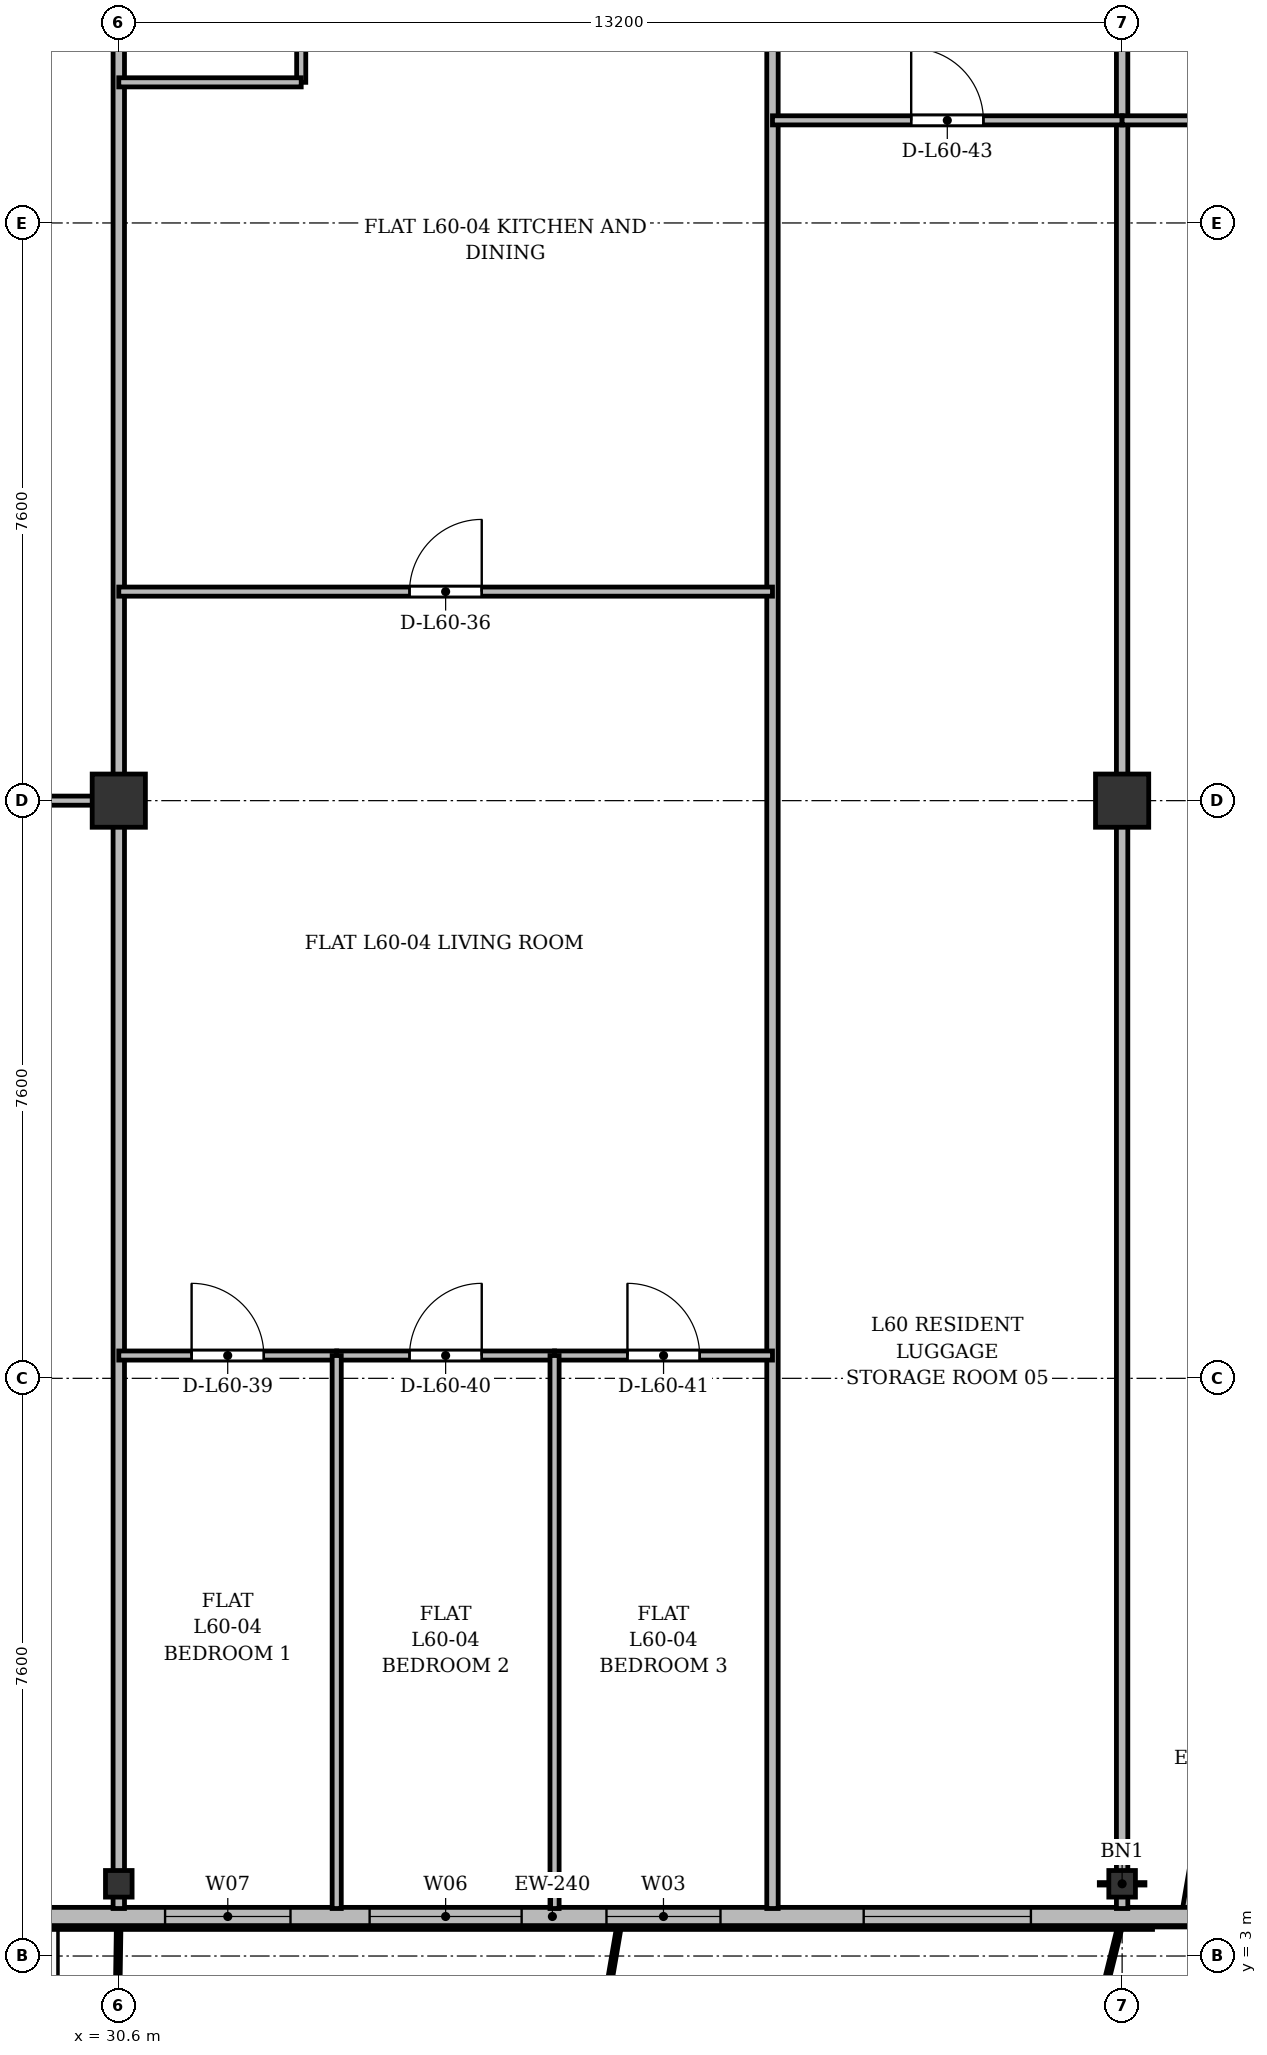
"""IFC4 building model, lengths in metres.
Left out: names, types, materials, properties, quantities, classifications, styles, units other than length and angle.
Written with IfcOpenShell. Run it as: python <this file> out.ifc"""

import sys

from ifc_helpers import new_model, si_unit, direction, frame, frame_2d, origin, origin_2d, place, context, subcontext, project, spatial, rectangle, i_section, extrude, source, transform, mapped, element, fill, save


model = new_model("IFC4")
c1 = context("Model", 3, precision=1e-05, world=origin(), true_north=direction((0.0, 1.0)))
c2 = subcontext(c1, "Body", "Model", "MODEL_VIEW")
j1 = project(units=[si_unit("LENGTHUNIT", "METRE"), si_unit("PLANEANGLEUNIT", "RADIAN")], contexts=[c1])
p1 = place(None, origin())
s1 = spatial("IfcSite", under=j1, at=p1, CompositionType="ELEMENT")
p2 = place(p1, origin())
s2 = spatial("IfcBuilding", under=s1, at=p2, CompositionType="ELEMENT")
p3 = place(p2, frame((0.0, 0.0, 230.1)))
s3 = spatial("IfcBuildingStorey", under=s2, at=p3, CompositionType="ELEMENT", Elevation=230.1)
m1 = source(origin(), c2, "Body", "SweptSolid", [
    extrude(i_section(OverallWidth=0.35, OverallDepth=0.35, WebThickness=0.018, FlangeThickness=0.028, at=origin_2d()), origin(), (0.0, 0.0, 1.0), 3.6),
])
p4 = place(p3, frame((30.6, 3.95, 0.0), z_axis=(0.0, 0.0, 1.0), x_axis=(1.0, 0.0, 0.0)))
e1 = element("IfcColumn", 1, at=p4, inside=s3, PredefinedType="COLUMN", context=c2, shape_type="MappedRepresentation", body=[
    mapped(m1, transform((0.0, 0.0, 0.0), x_axis=(1.0, 0.0, 0.0), y_axis=(0.0, 1.0, 0.0), z_axis=(0.0, 0.0, 1.0), scale=1.0)),
])
m2 = source(origin(), c2, "Body", "SweptSolid", [
    extrude(rectangle(XDim=0.7, YDim=0.7, at=origin_2d()), origin(), (0.0, 0.0, 1.0), 3.6),
])
p5 = place(p3, frame((30.6, 18.2, 0.0), z_axis=(0.0, 0.0, 1.0), x_axis=(1.0, 0.0, 0.0)))
e2 = element("IfcColumn", 2, at=p5, inside=s3, PredefinedType="COLUMN", context=c2, shape_type="MappedRepresentation", body=[
    mapped(m2, transform((0.0, 0.0, 0.0), x_axis=(1.0, 0.0, 0.0), y_axis=(0.0, 1.0, 0.0), z_axis=(0.0, 0.0, 1.0), scale=1.0)),
])
p6 = place(p3, frame((43.8, 3.95, 0.0), z_axis=(0.0, 0.0, 1.0), x_axis=(1.0, 0.0, 0.0)))
e3 = element("IfcColumn", 3, at=p6, inside=s3, PredefinedType="COLUMN", context=c2, shape_type="MappedRepresentation", body=[
    mapped(m1, transform((0.0, 0.0, 0.0), x_axis=(1.0, 0.0, 0.0), y_axis=(0.0, 1.0, 0.0), z_axis=(0.0, 0.0, 1.0), scale=1.0)),
])
p7 = place(p3, frame((43.8, 18.2, 0.0), z_axis=(0.0, 0.0, 1.0), x_axis=(1.0, 0.0, 0.0)))
e4 = element("IfcColumn", 4, at=p7, inside=s3, PredefinedType="COLUMN", context=c2, shape_type="MappedRepresentation", body=[
    mapped(m2, transform((0.0, 0.0, 0.0), x_axis=(1.0, 0.0, 0.0), y_axis=(0.0, 1.0, 0.0), z_axis=(0.0, 0.0, 1.0), scale=1.0)),
])
p8 = place(p3, frame((45.282, 6.92, 0.0), z_axis=(0.0, 0.0, 1.0), x_axis=(-0.168990530437, -0.98561767467, 0.0)))
e5 = element("IfcWall", 5, at=p8, inside=s3, PredefinedType="SOLIDWALL", context=c2, shape_type="SweptSolid", body=[
    extrude(rectangle(XDim=3.551, YDim=0.24, at=frame_2d((1.775, 0.0))), origin(), (0.0, 0.0, 1.0), 2.91),
])
p9 = place(p3, frame((44.8, 3.52, 0.0), z_axis=(0.0, 0.0, 1.0), x_axis=(-1.0, 0.0, 0.0)))
e6 = element("IfcWall", 6, at=p9, inside=s3, PredefinedType="SOLIDWALL", context=c2, shape_type="SweptSolid", body=[
    extrude(rectangle(XDim=33.8, YDim=0.24, at=frame_2d((16.9, 0.0))), origin(), (0.0, 0.0, 1.0), 3.36),
])
p10 = place(p9, frame((2.2, 0.0, 0.9)))
e7 = element("IfcOpeningElement", 7, at=p10, cuts=e6, PredefinedType="OPENING", context=c2, shape_type="SweptSolid", body=[
    extrude(rectangle(XDim=2.2, YDim=1.8, at=frame_2d((1.1, 0.9))), frame((0.0, 0.13, 0.0), z_axis=(0.0, -1.0, 0.0), x_axis=(1.0, 0.0, 0.0)), (0.0, 0.0, 1.0), 0.26),
])
p11 = place(p9, frame((6.284, 0.0, 0.9)))
e8 = element("IfcOpeningElement", 8, at=p11, cuts=e6, PredefinedType="OPENING", context=c2, shape_type="SweptSolid", body=[
    extrude(rectangle(XDim=1.5, YDim=1.75, at=frame_2d((0.75, 0.875))), frame((0.0, 0.13, 0.0), z_axis=(0.0, -1.0, 0.0), x_axis=(1.0, 0.0, 0.0)), (0.0, 0.0, 1.0), 0.26),
])
p12 = place(p9, frame((8.9, 0.0, 0.9)))
e9 = element("IfcOpeningElement", 9, at=p12, cuts=e6, PredefinedType="OPENING", context=c2, shape_type="SweptSolid", body=[
    extrude(rectangle(XDim=2.0, YDim=1.95, at=frame_2d((1.0, 0.975))), frame((0.0, 0.13, 0.0), z_axis=(0.0, -1.0, 0.0), x_axis=(1.0, 0.0, 0.0)), (0.0, 0.0, 1.0), 0.26),
])
p13 = place(p9, frame((11.941, 0.0, 0.9)))
e10 = element("IfcOpeningElement", 10, at=p13, cuts=e6, PredefinedType="OPENING", context=c2, shape_type="SweptSolid", body=[
    extrude(rectangle(XDim=1.65, YDim=1.85, at=frame_2d((0.825, 0.925))), frame((0.0, 0.13, 0.0), z_axis=(0.0, -1.0, 0.0), x_axis=(1.0, 0.0, 0.0)), (0.0, 0.0, 1.0), 0.26),
])
p14 = place(p9, frame((17.291, 0.0, 0.0)))
e11 = element("IfcOpeningElement", 11, at=p14, cuts=e6, PredefinedType="OPENING", context=c2, shape_type="SweptSolid", body=[
    extrude(rectangle(XDim=1.2, YDim=2.2, at=frame_2d((0.6, 1.1))), frame((0.0, 0.13, 0.0), z_axis=(0.0, -1.0, 0.0), x_axis=(1.0, 0.0, 0.0)), (0.0, 0.0, 1.0), 0.26),
])
p15 = place(p9, frame((22.25, 0.0, 0.9)))
e12 = element("IfcOpeningElement", 12, at=p15, cuts=e6, PredefinedType="OPENING", context=c2, shape_type="SweptSolid", body=[
    extrude(rectangle(XDim=2.2, YDim=1.8, at=frame_2d((1.1, 0.9))), frame((0.0, 0.13, 0.0), z_axis=(0.0, -1.0, 0.0), x_axis=(1.0, 0.0, 0.0)), (0.0, 0.0, 1.0), 0.26),
])
p16 = place(p9, frame((26.5, 0.0, 0.9)))
e13 = element("IfcOpeningElement", 13, at=p16, cuts=e6, PredefinedType="OPENING", context=c2, shape_type="SweptSolid", body=[
    extrude(rectangle(XDim=1.5, YDim=1.75, at=frame_2d((0.75, 0.875))), frame((0.0, 0.13, 0.0), z_axis=(0.0, -1.0, 0.0), x_axis=(1.0, 0.0, 0.0)), (0.0, 0.0, 1.0), 0.26),
])
p17 = place(p9, frame((30.455, 0.0, 0.9)))
e14 = element("IfcOpeningElement", 14, at=p17, cuts=e6, PredefinedType="OPENING", context=c2, shape_type="SweptSolid", body=[
    extrude(rectangle(XDim=2.0, YDim=1.95, at=frame_2d((1.0, 0.975))), frame((0.0, 0.13, 0.0), z_axis=(0.0, -1.0, 0.0), x_axis=(1.0, 0.0, 0.0)), (0.0, 0.0, 1.0), 0.26),
])
p18 = place(p3, frame((30.6, 3.625, 0.0), z_axis=(0.0, 0.0, 1.0), x_axis=(0.0, 1.0, 0.0)))
e15 = element("IfcWall", 15, at=p18, inside=s3, PredefinedType="PARTITIONING", context=c2, shape_type="SweptSolid", body=[
    extrude(rectangle(XDim=27.375, YDim=0.15, at=frame_2d((13.688, 0.0))), origin(), (0.0, 0.0, 1.0), 2.86),
])
p19 = place(p3, frame((39.2, 3.625, 0.0), z_axis=(0.0, 0.0, 1.0), x_axis=(0.0, 1.0, 0.0)))
e16 = element("IfcWall", 16, at=p19, inside=s3, PredefinedType="PARTITIONING", context=c2, shape_type="SweptSolid", body=[
    extrude(rectangle(XDim=27.375, YDim=0.15, at=frame_2d((13.688, 0.0))), origin(), (0.0, 0.0, 1.0), 2.91),
])
p20 = place(p3, frame((43.8, 3.625, 0.0), z_axis=(0.0, 0.0, 1.0), x_axis=(0.0, 1.0, 0.0)))
e17 = element("IfcWall", 17, at=p20, inside=s3, PredefinedType="PARTITIONING", context=c2, shape_type="SweptSolid", body=[
    extrude(rectangle(XDim=27.375, YDim=0.15, at=frame_2d((13.688, 0.0))), origin(), (0.0, 0.0, 1.0), 2.86),
])
p21 = place(p3, frame((23.4, 18.2, 0.0), z_axis=(0.0, 0.0, 1.0), x_axis=(1.0, 0.0, 0.0)))
e18 = element("IfcWall", 18, at=p21, inside=s3, PredefinedType="PARTITIONING", context=c2, shape_type="SweptSolid", body=[
    extrude(rectangle(XDim=7.2, YDim=0.12, at=frame_2d((3.6, 0.0))), origin(), (0.0, 0.0, 1.0), 2.91),
])
p22 = place(p21, frame((3.125, 0.0, 0.0)))
e19 = element("IfcOpeningElement", 19, at=p22, cuts=e18, PredefinedType="OPENING", context=c2, shape_type="SweptSolid", body=[
    extrude(rectangle(XDim=0.95, YDim=2.15, at=frame_2d((0.475, 1.075))), frame((0.0, 0.07, 0.0), z_axis=(0.0, -1.0, 0.0), x_axis=(1.0, 0.0, 0.0)), (0.0, 0.0, 1.0), 0.14),
])
p23 = place(p3, frame((30.6, 20.95, 0.0), z_axis=(0.0, 0.0, 1.0), x_axis=(1.0, 0.0, 0.0)))
e20 = element("IfcWall", 20, at=p23, inside=s3, PredefinedType="PARTITIONING", context=c2, shape_type="SweptSolid", body=[
    extrude(rectangle(XDim=8.6, YDim=0.12, at=frame_2d((4.3, 0.0))), origin(), (0.0, 0.0, 1.0), 2.86),
])
p24 = place(p23, frame((3.825, 0.0, 0.0)))
e21 = element("IfcOpeningElement", 21, at=p24, cuts=e20, PredefinedType="OPENING", context=c2, shape_type="SweptSolid", body=[
    extrude(rectangle(XDim=0.95, YDim=2.15, at=frame_2d((0.475, 1.075))), frame((0.0, 0.07, 0.0), z_axis=(0.0, -1.0, 0.0), x_axis=(1.0, 0.0, 0.0)), (0.0, 0.0, 1.0), 0.14),
])
p25 = place(p3, frame((33.0, 27.65, 0.0), z_axis=(0.0, 0.0, 1.0), x_axis=(0.0, 1.0, 0.0)))
e22 = element("IfcWall", 22, at=p25, inside=s3, PredefinedType="PARTITIONING", context=c2, shape_type="SweptSolid", body=[
    extrude(rectangle(XDim=3.35, YDim=0.12, at=frame_2d((1.675, 0.0))), origin(), (0.0, 0.0, 1.0), 3.36),
])
p26 = place(p25, frame((0.8, 0.0, 0.0)))
e23 = element("IfcOpeningElement", 23, at=p26, cuts=e22, PredefinedType="OPENING", context=c2, shape_type="SweptSolid", body=[
    extrude(rectangle(XDim=0.85, YDim=2.1, at=frame_2d((0.425, 1.05))), frame((0.0, 0.07, 0.0), z_axis=(0.0, -1.0, 0.0), x_axis=(1.0, 0.0, 0.0)), (0.0, 0.0, 1.0), 0.14),
])
p27 = place(p3, frame((30.6, 27.65, 0.0), z_axis=(0.0, 0.0, 1.0), x_axis=(1.0, 0.0, 0.0)))
e24 = element("IfcWall", 24, at=p27, inside=s3, PredefinedType="PARTITIONING", context=c2, shape_type="SweptSolid", body=[
    extrude(rectangle(XDim=2.4, YDim=0.12, at=frame_2d((1.2, 0.0))), origin(), (0.0, 0.0, 1.0), 2.86),
])
p28 = place(p3, frame((30.6, 10.9, 0.0), z_axis=(0.0, 0.0, 1.0), x_axis=(1.0, 0.0, 0.0)))
e25 = element("IfcWall", 25, at=p28, inside=s3, PredefinedType="PARTITIONING", context=c2, shape_type="SweptSolid", body=[
    extrude(rectangle(XDim=2.867, YDim=0.12, at=frame_2d((1.434, 0.0))), origin(), (0.0, 0.0, 1.0), 2.86),
])
p29 = place(p28, frame((0.958, 0.0, 0.0)))
e26 = element("IfcOpeningElement", 26, at=p29, cuts=e25, PredefinedType="OPENING", context=c2, shape_type="SweptSolid", body=[
    extrude(rectangle(XDim=0.95, YDim=2.15, at=frame_2d((0.475, 1.075))), frame((0.0, 0.07, 0.0), z_axis=(0.0, -1.0, 0.0), x_axis=(1.0, 0.0, 0.0)), (0.0, 0.0, 1.0), 0.14),
])
p30 = place(p3, frame((33.467, 10.9, 0.0), z_axis=(0.0, 0.0, 1.0), x_axis=(1.0, 0.0, 0.0)))
e27 = element("IfcWall", 27, at=p30, inside=s3, PredefinedType="PARTITIONING", context=c2, shape_type="SweptSolid", body=[
    extrude(rectangle(XDim=2.866, YDim=0.12, at=frame_2d((1.433, 0.0))), origin(), (0.0, 0.0, 1.0), 3.36),
])
p31 = place(p30, frame((0.958, 0.0, 0.0)))
e28 = element("IfcOpeningElement", 28, at=p31, cuts=e27, PredefinedType="OPENING", context=c2, shape_type="SweptSolid", body=[
    extrude(rectangle(XDim=0.95, YDim=2.15, at=frame_2d((0.475, 1.075))), frame((0.0, 0.07, 0.0), z_axis=(0.0, -1.0, 0.0), x_axis=(1.0, 0.0, 0.0)), (0.0, 0.0, 1.0), 0.14),
])
p32 = place(p3, frame((33.467, 3.625, 0.0), z_axis=(0.0, 0.0, 1.0), x_axis=(0.0, 1.0, 0.0)))
e29 = element("IfcWall", 29, at=p32, inside=s3, PredefinedType="PARTITIONING", context=c2, shape_type="SweptSolid", body=[
    extrude(rectangle(XDim=7.275, YDim=0.12, at=frame_2d((3.637, 0.0))), origin(), (0.0, 0.0, 1.0), 2.91),
])
p33 = place(p3, frame((36.333, 10.9, 0.0), z_axis=(0.0, 0.0, 1.0), x_axis=(1.0, 0.0, 0.0)))
e30 = element("IfcWall", 30, at=p33, inside=s3, PredefinedType="PARTITIONING", context=c2, shape_type="SweptSolid", body=[
    extrude(rectangle(XDim=2.867, YDim=0.12, at=frame_2d((1.434, 0.0))), origin(), (0.0, 0.0, 1.0), 3.36),
])
p34 = place(p33, frame((0.959, 0.0, 0.0)))
e31 = element("IfcOpeningElement", 31, at=p34, cuts=e30, PredefinedType="OPENING", context=c2, shape_type="SweptSolid", body=[
    extrude(rectangle(XDim=0.95, YDim=2.15, at=frame_2d((0.475, 1.075))), frame((0.0, 0.07, 0.0), z_axis=(0.0, -1.0, 0.0), x_axis=(1.0, 0.0, 0.0)), (0.0, 0.0, 1.0), 0.14),
])
p35 = place(p3, frame((36.333, 3.625, 0.0), z_axis=(0.0, 0.0, 1.0), x_axis=(0.0, 1.0, 0.0)))
e32 = element("IfcWall", 32, at=p35, inside=s3, PredefinedType="PARTITIONING", context=c2, shape_type="SweptSolid", body=[
    extrude(rectangle(XDim=7.275, YDim=0.12, at=frame_2d((3.637, 0.0))), origin(), (0.0, 0.0, 1.0), 2.91),
])
p36 = place(p3, frame((39.2, 27.15, 0.0), z_axis=(0.0, 0.0, 1.0), x_axis=(1.0, 0.0, 0.0)))
e33 = element("IfcWall", 33, at=p36, inside=s3, PredefinedType="PARTITIONING", context=c2, shape_type="SweptSolid", body=[
    extrude(rectangle(XDim=4.6, YDim=0.12, at=frame_2d((2.3, 0.0))), origin(), (0.0, 0.0, 1.0), 2.86),
])
p37 = place(p36, frame((1.825, 0.0, 0.0)))
e34 = element("IfcOpeningElement", 34, at=p37, cuts=e33, PredefinedType="OPENING", context=c2, shape_type="SweptSolid", body=[
    extrude(rectangle(XDim=0.95, YDim=2.15, at=frame_2d((0.475, 1.075))), frame((0.0, 0.07, 0.0), z_axis=(0.0, -1.0, 0.0), x_axis=(1.0, 0.0, 0.0)), (0.0, 0.0, 1.0), 0.14),
])
p38 = place(p3, frame((43.8, 27.15, 0.0), z_axis=(0.0, 0.0, 1.0), x_axis=(1.0, 0.0, 0.0)))
e35 = element("IfcWall", 35, at=p38, inside=s3, PredefinedType="PARTITIONING", context=c2, shape_type="SweptSolid", body=[
    extrude(rectangle(XDim=7.2, YDim=0.12, at=frame_2d((3.6, 0.0))), origin(), (0.0, 0.0, 1.0), 2.86),
])
p39 = place(p38, frame((3.125, 0.0, 0.0)))
e36 = element("IfcOpeningElement", 36, at=p39, cuts=e35, PredefinedType="OPENING", context=c2, shape_type="SweptSolid", body=[
    extrude(rectangle(XDim=0.95, YDim=2.15, at=frame_2d((0.475, 1.075))), frame((0.0, 0.07, 0.0), z_axis=(0.0, -1.0, 0.0), x_axis=(1.0, 0.0, 0.0)), (0.0, 0.0, 1.0), 0.14),
])
m3 = source(origin(), c2, "Body", "SweptSolid", [
    extrude(rectangle(XDim=2.2, YDim=1.8, at=frame_2d((1.1, 0.9))), frame((0.0, 0.03, 0.0), z_axis=(0.0, -1.0, 0.0), x_axis=(1.0, 0.0, 0.0)), (0.0, 0.0, 1.0), 0.06),
])
p40 = place(p10, origin())
e37 = element("IfcWindow", 37, at=p40, inside=s3, PartitioningType="SINGLE_PANEL", PredefinedType="WINDOW", context=c2, shape_type="MappedRepresentation", body=[
    mapped(m3, transform((0.0, 0.0, 0.0), x_axis=(1.0, 0.0, 0.0), y_axis=(0.0, 1.0, 0.0), z_axis=(0.0, 0.0, 1.0), scale=1.0)),
])
fill(e7, e37)
m4 = source(origin(), c2, "Body", "SweptSolid", [
    extrude(rectangle(XDim=1.5, YDim=1.75, at=frame_2d((0.75, 0.875))), frame((0.0, 0.03, 0.0), z_axis=(0.0, -1.0, 0.0), x_axis=(1.0, 0.0, 0.0)), (0.0, 0.0, 1.0), 0.06),
])
p41 = place(p11, origin())
e38 = element("IfcWindow", 38, at=p41, inside=s3, PartitioningType="SINGLE_PANEL", PredefinedType="WINDOW", context=c2, shape_type="MappedRepresentation", body=[
    mapped(m4, transform((0.0, 0.0, 0.0), x_axis=(1.0, 0.0, 0.0), y_axis=(0.0, 1.0, 0.0), z_axis=(0.0, 0.0, 1.0), scale=1.0)),
])
fill(e8, e38)
m5 = source(origin(), c2, "Body", "SweptSolid", [
    extrude(rectangle(XDim=2.0, YDim=1.95, at=frame_2d((1.0, 0.975))), frame((0.0, 0.03, 0.0), z_axis=(0.0, -1.0, 0.0), x_axis=(1.0, 0.0, 0.0)), (0.0, 0.0, 1.0), 0.06),
])
p42 = place(p12, origin())
e39 = element("IfcWindow", 39, at=p42, inside=s3, PartitioningType="SINGLE_PANEL", PredefinedType="WINDOW", context=c2, shape_type="MappedRepresentation", body=[
    mapped(m5, transform((0.0, 0.0, 0.0), x_axis=(1.0, 0.0, 0.0), y_axis=(0.0, 1.0, 0.0), z_axis=(0.0, 0.0, 1.0), scale=1.0)),
])
fill(e9, e39)
m6 = source(origin(), c2, "Body", "SweptSolid", [
    extrude(rectangle(XDim=1.65, YDim=1.85, at=frame_2d((0.825, 0.925))), frame((0.0, 0.03, 0.0), z_axis=(0.0, -1.0, 0.0), x_axis=(1.0, 0.0, 0.0)), (0.0, 0.0, 1.0), 0.06),
])
p43 = place(p13, origin())
e40 = element("IfcWindow", 40, at=p43, inside=s3, PartitioningType="SINGLE_PANEL", PredefinedType="WINDOW", context=c2, shape_type="MappedRepresentation", body=[
    mapped(m6, transform((0.0, 0.0, 0.0), x_axis=(1.0, 0.0, 0.0), y_axis=(0.0, 1.0, 0.0), z_axis=(0.0, 0.0, 1.0), scale=1.0)),
])
fill(e10, e40)
m7 = source(origin(), c2, "Body", "SweptSolid", [
    extrude(rectangle(XDim=0.95, YDim=2.15, at=frame_2d((0.475, 1.075))), frame((0.0, 0.025, 0.0), z_axis=(0.0, -1.0, 0.0), x_axis=(1.0, 0.0, 0.0)), (0.0, 0.0, 1.0), 0.05),
])
p44 = place(p24, origin())
e41 = element("IfcDoor", 41, at=p44, inside=s3, OperationType="SINGLE_SWING_RIGHT", PredefinedType="DOOR", context=c2, shape_type="MappedRepresentation", body=[
    mapped(m7, transform((0.0, 0.0, 0.0), x_axis=(1.0, 0.0, 0.0), y_axis=(0.0, 1.0, 0.0), z_axis=(0.0, 0.0, 1.0), scale=1.0)),
])
fill(e21, e41)
p45 = place(p29, origin())
e42 = element("IfcDoor", 42, at=p45, inside=s3, OperationType="SINGLE_SWING_LEFT", PredefinedType="DOOR", context=c2, shape_type="MappedRepresentation", body=[
    mapped(m7, transform((0.0, 0.0, 0.0), x_axis=(1.0, 0.0, 0.0), y_axis=(0.0, 1.0, 0.0), z_axis=(0.0, 0.0, 1.0), scale=1.0)),
])
fill(e26, e42)
p46 = place(p31, origin())
e43 = element("IfcDoor", 43, at=p46, inside=s3, OperationType="SINGLE_SWING_RIGHT", PredefinedType="DOOR", context=c2, shape_type="MappedRepresentation", body=[
    mapped(m7, transform((0.0, 0.0, 0.0), x_axis=(1.0, 0.0, 0.0), y_axis=(0.0, 1.0, 0.0), z_axis=(0.0, 0.0, 1.0), scale=1.0)),
])
fill(e28, e43)
p47 = place(p34, origin())
e44 = element("IfcDoor", 44, at=p47, inside=s3, OperationType="SINGLE_SWING_LEFT", PredefinedType="DOOR", context=c2, shape_type="MappedRepresentation", body=[
    mapped(m7, transform((0.0, 0.0, 0.0), x_axis=(1.0, 0.0, 0.0), y_axis=(0.0, 1.0, 0.0), z_axis=(0.0, 0.0, 1.0), scale=1.0)),
])
fill(e31, e44)
p48 = place(p37, origin())
e45 = element("IfcDoor", 45, at=p48, inside=s3, OperationType="SINGLE_SWING_LEFT", PredefinedType="DOOR", context=c2, shape_type="MappedRepresentation", body=[
    mapped(m7, transform((0.0, 0.0, 0.0), x_axis=(1.0, 0.0, 0.0), y_axis=(0.0, 1.0, 0.0), z_axis=(0.0, 0.0, 1.0), scale=1.0)),
])
fill(e34, e45)
save(model, sys.argv[1])
